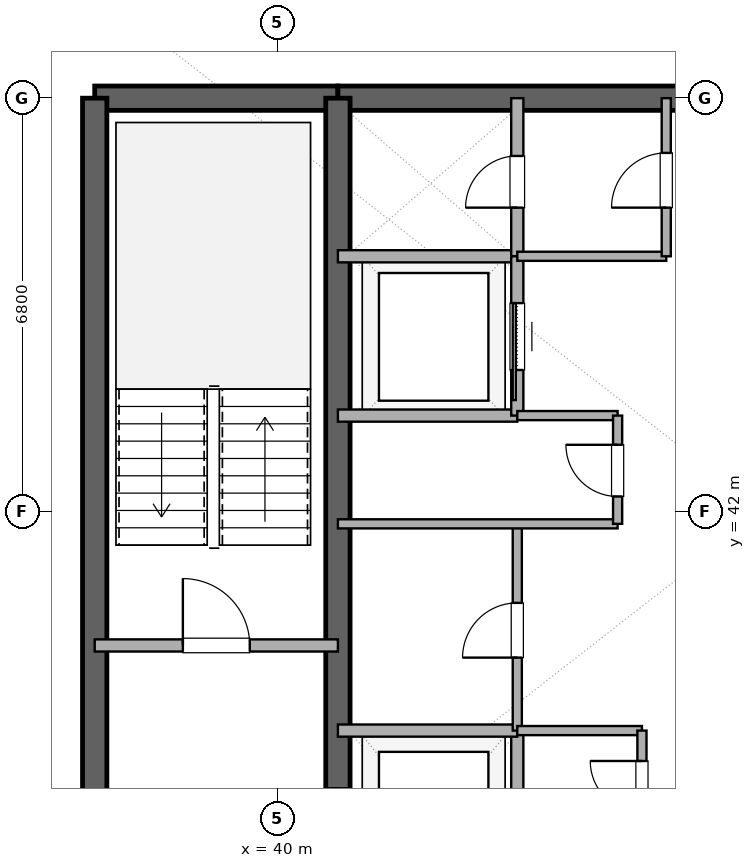
"""IFC4 building model, lengths in metres.
Left out: names, types, materials, properties, quantities, classifications, styles, units other than length and angle.
Written with IfcOpenShell. Run it as: python <this file> out.ifc"""

import sys

from ifc_helpers import new_model, si_unit, direction, frame, frame_2d, origin, place, context, subcontext, project, spatial, rectangle, extrude, element, fill, save


model = new_model("IFC4")
c1 = context("Model", 3, precision=1e-05, world=origin(), true_north=direction((0.0, 1.0)))
c2 = subcontext(c1, "Body", "Model", "MODEL_VIEW")
j1 = project(units=[si_unit("LENGTHUNIT", "METRE"), si_unit("PLANEANGLEUNIT", "RADIAN")], contexts=[c1])
p1 = place(None, origin())
s1 = spatial("IfcSite", under=j1, at=p1, CompositionType="ELEMENT")
p2 = place(p1, origin())
s2 = spatial("IfcBuilding", under=s1, at=p2, CompositionType="ELEMENT")
p3 = place(p2, frame((0.0, 0.0, 220.8)))
s3 = spatial("IfcBuildingStorey", under=s2, at=p3, CompositionType="ELEMENT", Elevation=220.8)
p4 = place(p3, frame((37.0, 48.8, 0.0), z_axis=(0.0, 0.0, 1.0), x_axis=(1.0, 0.0, 0.0)))
e1 = element("IfcWall", 1, at=p4, inside=s3, PredefinedType="SHEAR", context=c2, shape_type="SweptSolid", body=[
    extrude(rectangle(XDim=4.0, YDim=0.4, at=frame_2d((2.0, 0.0))), origin(), (0.0, 0.0, 1.0), 3.36),
])
p5 = place(p3, frame((41.0, 48.8, 0.0), z_axis=(0.0, 0.0, 1.0), x_axis=(1.0, 0.0, 0.0)))
e2 = element("IfcWall", 2, at=p5, inside=s3, PredefinedType="SHEAR", context=c2, shape_type="SweptSolid", body=[
    extrude(rectangle(XDim=14.0, YDim=0.4, at=frame_2d((7.0, 0.0))), origin(), (0.0, 0.0, 1.0), 3.36),
])
p6 = place(p5, frame((6.1, 0.0, 0.0)))
e3 = element("IfcOpeningElement", 3, at=p6, cuts=e2, PredefinedType="OPENING", context=c2, shape_type="SweptSolid", body=[
    extrude(rectangle(XDim=1.8, YDim=2.25, at=frame_2d((0.9, 1.125))), frame((0.0, 0.21, 0.0), z_axis=(0.0, -1.0, 0.0), x_axis=(1.0, 0.0, 0.0)), (0.0, 0.0, 1.0), 0.42),
])
p7 = place(p3, frame((37.0, 35.2, 0.0), z_axis=(0.0, 0.0, 1.0), x_axis=(0.0, 1.0, 0.0)))
e4 = element("IfcWall", 4, at=p7, inside=s3, PredefinedType="SHEAR", context=c2, shape_type="SweptSolid", body=[
    extrude(rectangle(XDim=13.6, YDim=0.4, at=frame_2d((6.8, 0.0))), origin(), (0.0, 0.0, 1.0), 3.36),
])
p8 = place(p3, frame((41.0, 35.2, 0.0), z_axis=(0.0, 0.0, 1.0), x_axis=(0.0, 1.0, 0.0)))
e5 = element("IfcWall", 5, at=p8, inside=s3, PredefinedType="SHEAR", context=c2, shape_type="SweptSolid", body=[
    extrude(rectangle(XDim=13.6, YDim=0.4, at=frame_2d((6.8, 0.0))), origin(), (0.0, 0.0, 1.0), 3.36),
])
p9 = place(p8, frame((1.15, 0.0, 0.0)))
e6 = element("IfcOpeningElement", 6, at=p9, cuts=e5, PredefinedType="OPENING", context=c2, shape_type="SweptSolid", body=[
    extrude(rectangle(XDim=1.1, YDim=2.2, at=frame_2d((0.55, 1.1))), frame((0.0, 0.21, 0.0), z_axis=(0.0, -1.0, 0.0), x_axis=(1.0, 0.0, 0.0)), (0.0, 0.0, 1.0), 0.42),
])
p10 = place(p3, frame((37.0, 39.8, 0.0), z_axis=(0.0, 0.0, 1.0), x_axis=(1.0, 0.0, 0.0)))
e7 = element("IfcWall", 7, at=p10, inside=s3, PredefinedType="SOLIDWALL", context=c2, shape_type="SweptSolid", body=[
    extrude(rectangle(XDim=4.0, YDim=0.2, at=frame_2d((2.0, 0.0))), origin(), (0.0, 0.0, 1.0), 2.72),
])
p11 = place(p10, frame((1.45, 0.0, 0.0)))
e8 = element("IfcOpeningElement", 8, at=p11, cuts=e7, PredefinedType="OPENING", context=c2, shape_type="SweptSolid", body=[
    extrude(rectangle(XDim=1.1, YDim=2.15, at=frame_2d((0.55, 1.075))), frame((0.0, 0.11, 0.0), z_axis=(0.0, -1.0, 0.0), x_axis=(1.0, 0.0, 0.0)), (0.0, 0.0, 1.0), 0.22),
])
p12 = place(p3, frame((43.95, 35.2, 0.0), z_axis=(0.0, 0.0, 1.0), x_axis=(0.0, 1.0, 0.0)))
e9 = element("IfcWall", 9, at=p12, inside=s3, PredefinedType="SOLIDWALL", context=c2, shape_type="SweptSolid", body=[
    extrude(rectangle(XDim=3.2, YDim=0.2, at=frame_2d((1.6, 0.0))), origin(), (0.0, 0.0, 1.0), 2.72),
])
for number, where, z_axis, x_axis in (
    (10, (41.0, 38.4, 0.0), (0.0, 0.0, 1.0), (1.0, 0.0, 0.0)),
    (11, (41.0, 46.2, 0.0), (0.0, 0.0, 1.0), (1.0, 0.0, 0.0)),
):
    element("IfcWall", number, at=place(p3, frame(where, z_axis=z_axis, x_axis=x_axis)), inside=s3, PredefinedType="SOLIDWALL", context=c2, shape_type="SweptSolid", body=[
        extrude(rectangle(XDim=2.95, YDim=0.2, at=frame_2d((1.475, 0.0))), origin(), (0.0, 0.0, 1.0), 2.72),
    ])
p13 = place(p3, frame((43.95, 46.2, 0.0), z_axis=(0.0, 0.0, 1.0), x_axis=(0.0, 1.0, 0.0)))
e12 = element("IfcWall", 12, at=p13, inside=s3, PredefinedType="SOLIDWALL", context=c2, shape_type="SweptSolid", body=[
    extrude(rectangle(XDim=2.6, YDim=0.2, at=frame_2d((1.3, 0.0))), origin(), (0.0, 0.0, 1.0), 2.72),
])
p14 = place(p13, frame((0.8, 0.0, 0.0)))
e13 = element("IfcOpeningElement", 13, at=p14, cuts=e12, PredefinedType="OPENING", context=c2, shape_type="SweptSolid", body=[
    extrude(rectangle(XDim=0.85, YDim=2.15, at=frame_2d((0.425, 1.075))), frame((0.0, 0.11, 0.0), z_axis=(0.0, -1.0, 0.0), x_axis=(1.0, 0.0, 0.0)), (0.0, 0.0, 1.0), 0.22),
])
p15 = place(p3, frame((41.0, 43.58, 0.0), z_axis=(0.0, 0.0, 1.0), x_axis=(1.0, 0.0, 0.0)))
e14 = element("IfcWall", 14, at=p15, inside=s3, PredefinedType="SOLIDWALL", context=c2, shape_type="SweptSolid", body=[
    extrude(rectangle(XDim=2.95, YDim=0.2, at=frame_2d((1.475, 0.0))), origin(), (0.0, 0.0, 1.0), 2.72),
])
p16 = place(p3, frame((43.95, 43.58, 0.0), z_axis=(0.0, 0.0, 1.0), x_axis=(0.0, 1.0, 0.0)))
e15 = element("IfcWall", 15, at=p16, inside=s3, PredefinedType="SOLIDWALL", context=c2, shape_type="SweptSolid", body=[
    extrude(rectangle(XDim=2.62, YDim=0.2, at=frame_2d((1.31, 0.0))), origin(), (0.0, 0.0, 1.0), 2.72),
])
p17 = place(p16, frame((0.75, 0.0, 0.0)))
e16 = element("IfcOpeningElement", 16, at=p17, cuts=e15, PredefinedType="OPENING", context=c2, shape_type="SweptSolid", body=[
    extrude(rectangle(XDim=1.1, YDim=2.2, at=frame_2d((0.55, 1.1))), frame((0.0, 0.11, 0.0), z_axis=(0.0, -1.0, 0.0), x_axis=(1.0, 0.0, 0.0)), (0.0, 0.0, 1.0), 0.22),
])
p18 = place(p3, frame((43.95, 38.4, 0.0), z_axis=(0.0, 0.0, 1.0), x_axis=(0.0, 1.0, 0.0)))
e17 = element("IfcWall", 17, at=p18, inside=s3, PredefinedType="PARTITIONING", context=c2, shape_type="SweptSolid", body=[
    extrude(rectangle(XDim=3.4, YDim=0.15, at=frame_2d((1.7, 0.0))), origin(), (0.0, 0.0, 1.0), 2.72),
])
p19 = place(p18, frame((1.2, 0.0, 0.0)))
e18 = element("IfcOpeningElement", 18, at=p19, cuts=e17, PredefinedType="OPENING", context=c2, shape_type="SweptSolid", body=[
    extrude(rectangle(XDim=0.9, YDim=2.15, at=frame_2d((0.45, 1.075))), frame((0.0, 0.085, 0.0), z_axis=(0.0, -1.0, 0.0), x_axis=(1.0, 0.0, 0.0)), (0.0, 0.0, 1.0), 0.17),
])
p20 = place(p3, frame((41.0, 41.8, 0.0), z_axis=(0.0, 0.0, 1.0), x_axis=(1.0, 0.0, 0.0)))
e19 = element("IfcWall", 19, at=p20, inside=s3, PredefinedType="PARTITIONING", context=c2, shape_type="SweptSolid", body=[
    extrude(rectangle(XDim=4.6, YDim=0.15, at=frame_2d((2.3, 0.0))), origin(), (0.0, 0.0, 1.0), 2.72),
])
p21 = place(p3, frame((43.95, 43.58, 0.0), z_axis=(0.0, 0.0, 1.0), x_axis=(1.0, 0.0, 0.0)))
e20 = element("IfcWall", 20, at=p21, inside=s3, PredefinedType="PARTITIONING", context=c2, shape_type="SweptSolid", body=[
    extrude(rectangle(XDim=1.65, YDim=0.15, at=frame_2d((0.825, 0.0))), origin(), (0.0, 0.0, 1.0), 2.72),
])
p22 = place(p3, frame((45.6, 41.8, 0.0), z_axis=(0.0, 0.0, 1.0), x_axis=(0.0, 1.0, 0.0)))
e21 = element("IfcWall", 21, at=p22, inside=s3, PredefinedType="PARTITIONING", context=c2, shape_type="SweptSolid", body=[
    extrude(rectangle(XDim=1.78, YDim=0.15, at=frame_2d((0.89, 0.0))), origin(), (0.0, 0.0, 1.0), 2.72),
])
p23 = place(p22, frame((0.45, 0.0, 0.0)))
e22 = element("IfcOpeningElement", 22, at=p23, cuts=e21, PredefinedType="OPENING", context=c2, shape_type="SweptSolid", body=[
    extrude(rectangle(XDim=0.85, YDim=2.15, at=frame_2d((0.425, 1.075))), frame((0.0, 0.085, 0.0), z_axis=(0.0, -1.0, 0.0), x_axis=(1.0, 0.0, 0.0)), (0.0, 0.0, 1.0), 0.17),
])
p24 = place(p3, frame((43.95, 38.4, 0.0), z_axis=(0.0, 0.0, 1.0), x_axis=(1.0, 0.0, 0.0)))
e23 = element("IfcWall", 23, at=p24, inside=s3, PredefinedType="PARTITIONING", context=c2, shape_type="SweptSolid", body=[
    extrude(rectangle(XDim=2.05, YDim=0.15, at=frame_2d((1.025, 0.0))), origin(), (0.0, 0.0, 1.0), 2.72),
])
p25 = place(p3, frame((46.0, 35.2, 0.0), z_axis=(0.0, 0.0, 1.0), x_axis=(0.0, 1.0, 0.0)))
e24 = element("IfcWall", 24, at=p25, inside=s3, PredefinedType="PARTITIONING", context=c2, shape_type="SweptSolid", body=[
    extrude(rectangle(XDim=3.2, YDim=0.15, at=frame_2d((1.6, 0.0))), origin(), (0.0, 0.0, 1.0), 2.72),
])
p26 = place(p25, frame((0.4, 0.0, 0.0)))
e25 = element("IfcOpeningElement", 25, at=p26, cuts=e24, PredefinedType="OPENING", context=c2, shape_type="SweptSolid", body=[
    extrude(rectangle(XDim=0.85, YDim=2.15, at=frame_2d((0.425, 1.075))), frame((0.0, 0.085, 0.0), z_axis=(0.0, -1.0, 0.0), x_axis=(1.0, 0.0, 0.0)), (0.0, 0.0, 1.0), 0.17),
])
p27 = place(p25, frame((1.85, 0.0, 0.0)))
e26 = element("IfcOpeningElement", 26, at=p27, cuts=e24, PredefinedType="OPENING", context=c2, shape_type="SweptSolid", body=[
    extrude(rectangle(XDim=0.85, YDim=2.15, at=frame_2d((0.425, 1.075))), frame((0.0, 0.085, 0.0), z_axis=(0.0, -1.0, 0.0), x_axis=(1.0, 0.0, 0.0)), (0.0, 0.0, 1.0), 0.17),
])
p28 = place(p3, frame((43.95, 46.2, 0.0), z_axis=(0.0, 0.0, 1.0), x_axis=(1.0, 0.0, 0.0)))
e27 = element("IfcWall", 27, at=p28, inside=s3, PredefinedType="PARTITIONING", context=c2, shape_type="SweptSolid", body=[
    extrude(rectangle(XDim=2.45, YDim=0.15, at=frame_2d((1.225, 0.0))), origin(), (0.0, 0.0, 1.0), 2.72),
])
p29 = place(p3, frame((46.4, 46.2, 0.0), z_axis=(0.0, 0.0, 1.0), x_axis=(0.0, 1.0, 0.0)))
e28 = element("IfcWall", 28, at=p29, inside=s3, PredefinedType="PARTITIONING", context=c2, shape_type="SweptSolid", body=[
    extrude(rectangle(XDim=2.6, YDim=0.15, at=frame_2d((1.3, 0.0))), origin(), (0.0, 0.0, 1.0), 2.72),
])
p30 = place(p29, frame((0.8, 0.0, 0.0)))
e29 = element("IfcOpeningElement", 29, at=p30, cuts=e28, PredefinedType="OPENING", context=c2, shape_type="SweptSolid", body=[
    extrude(rectangle(XDim=0.9, YDim=2.15, at=frame_2d((0.45, 1.075))), frame((0.0, 0.085, 0.0), z_axis=(0.0, -1.0, 0.0), x_axis=(1.0, 0.0, 0.0)), (0.0, 0.0, 1.0), 0.17),
])
p31 = place(p11, origin())
e30 = element("IfcDoor", 30, at=p31, inside=s3, OperationType="SINGLE_SWING_LEFT", PredefinedType="DOOR", context=c2, shape_type="SweptSolid", body=[
    extrude(rectangle(XDim=1.1, YDim=2.15, at=frame_2d((0.55, 1.075))), frame((0.0, 0.025, 0.0), z_axis=(0.0, -1.0, 0.0), x_axis=(1.0, 0.0, 0.0)), (0.0, 0.0, 1.0), 0.05),
])
fill(e8, e30)
p32 = place(p14, origin())
e31 = element("IfcDoor", 31, at=p32, inside=s3, OperationType="SINGLE_SWING_LEFT", PredefinedType="DOOR", context=c2, shape_type="SweptSolid", body=[
    extrude(rectangle(XDim=0.85, YDim=2.15, at=frame_2d((0.425, 1.075))), frame((0.0, 0.025, 0.0), z_axis=(0.0, -1.0, 0.0), x_axis=(1.0, 0.0, 0.0)), (0.0, 0.0, 1.0), 0.05),
])
fill(e13, e31)
p33 = place(p17, origin())
e32 = element("IfcDoor", 32, at=p33, inside=s3, OperationType="SLIDING_TO_LEFT", PredefinedType="DOOR", context=c2, shape_type="SweptSolid", body=[
    extrude(rectangle(XDim=1.1, YDim=2.2, at=frame_2d((0.55, 1.1))), frame((0.0, 0.025, 0.0), z_axis=(0.0, -1.0, 0.0), x_axis=(1.0, 0.0, 0.0)), (0.0, 0.0, 1.0), 0.05),
])
fill(e16, e32)
p34 = place(p19, origin())
e33 = element("IfcDoor", 33, at=p34, inside=s3, OperationType="SINGLE_SWING_LEFT", PredefinedType="DOOR", context=c2, shape_type="SweptSolid", body=[
    extrude(rectangle(XDim=0.9, YDim=2.15, at=frame_2d((0.45, 1.075))), frame((0.0, 0.025, 0.0), z_axis=(0.0, -1.0, 0.0), x_axis=(1.0, 0.0, 0.0)), (0.0, 0.0, 1.0), 0.05),
])
fill(e18, e33)
p35 = place(p23, origin())
e34 = element("IfcDoor", 34, at=p35, inside=s3, OperationType="SINGLE_SWING_RIGHT", PredefinedType="DOOR", context=c2, shape_type="SweptSolid", body=[
    extrude(rectangle(XDim=0.85, YDim=2.15, at=frame_2d((0.425, 1.075))), frame((0.0, 0.025, 0.0), z_axis=(0.0, -1.0, 0.0), x_axis=(1.0, 0.0, 0.0)), (0.0, 0.0, 1.0), 0.05),
])
fill(e22, e34)
p36 = place(p27, origin())
e35 = element("IfcDoor", 35, at=p36, inside=s3, OperationType="SINGLE_SWING_RIGHT", PredefinedType="DOOR", context=c2, shape_type="SweptSolid", body=[
    extrude(rectangle(XDim=0.85, YDim=2.15, at=frame_2d((0.425, 1.075))), frame((0.0, 0.025, 0.0), z_axis=(0.0, -1.0, 0.0), x_axis=(1.0, 0.0, 0.0)), (0.0, 0.0, 1.0), 0.05),
])
fill(e26, e35)
p37 = place(p30, origin())
e36 = element("IfcDoor", 36, at=p37, inside=s3, OperationType="SINGLE_SWING_LEFT", PredefinedType="DOOR", context=c2, shape_type="SweptSolid", body=[
    extrude(rectangle(XDim=0.9, YDim=2.15, at=frame_2d((0.45, 1.075))), frame((0.0, 0.025, 0.0), z_axis=(0.0, -1.0, 0.0), x_axis=(1.0, 0.0, 0.0)), (0.0, 0.0, 1.0), 0.05),
])
fill(e29, e36)
save(model, sys.argv[1])
